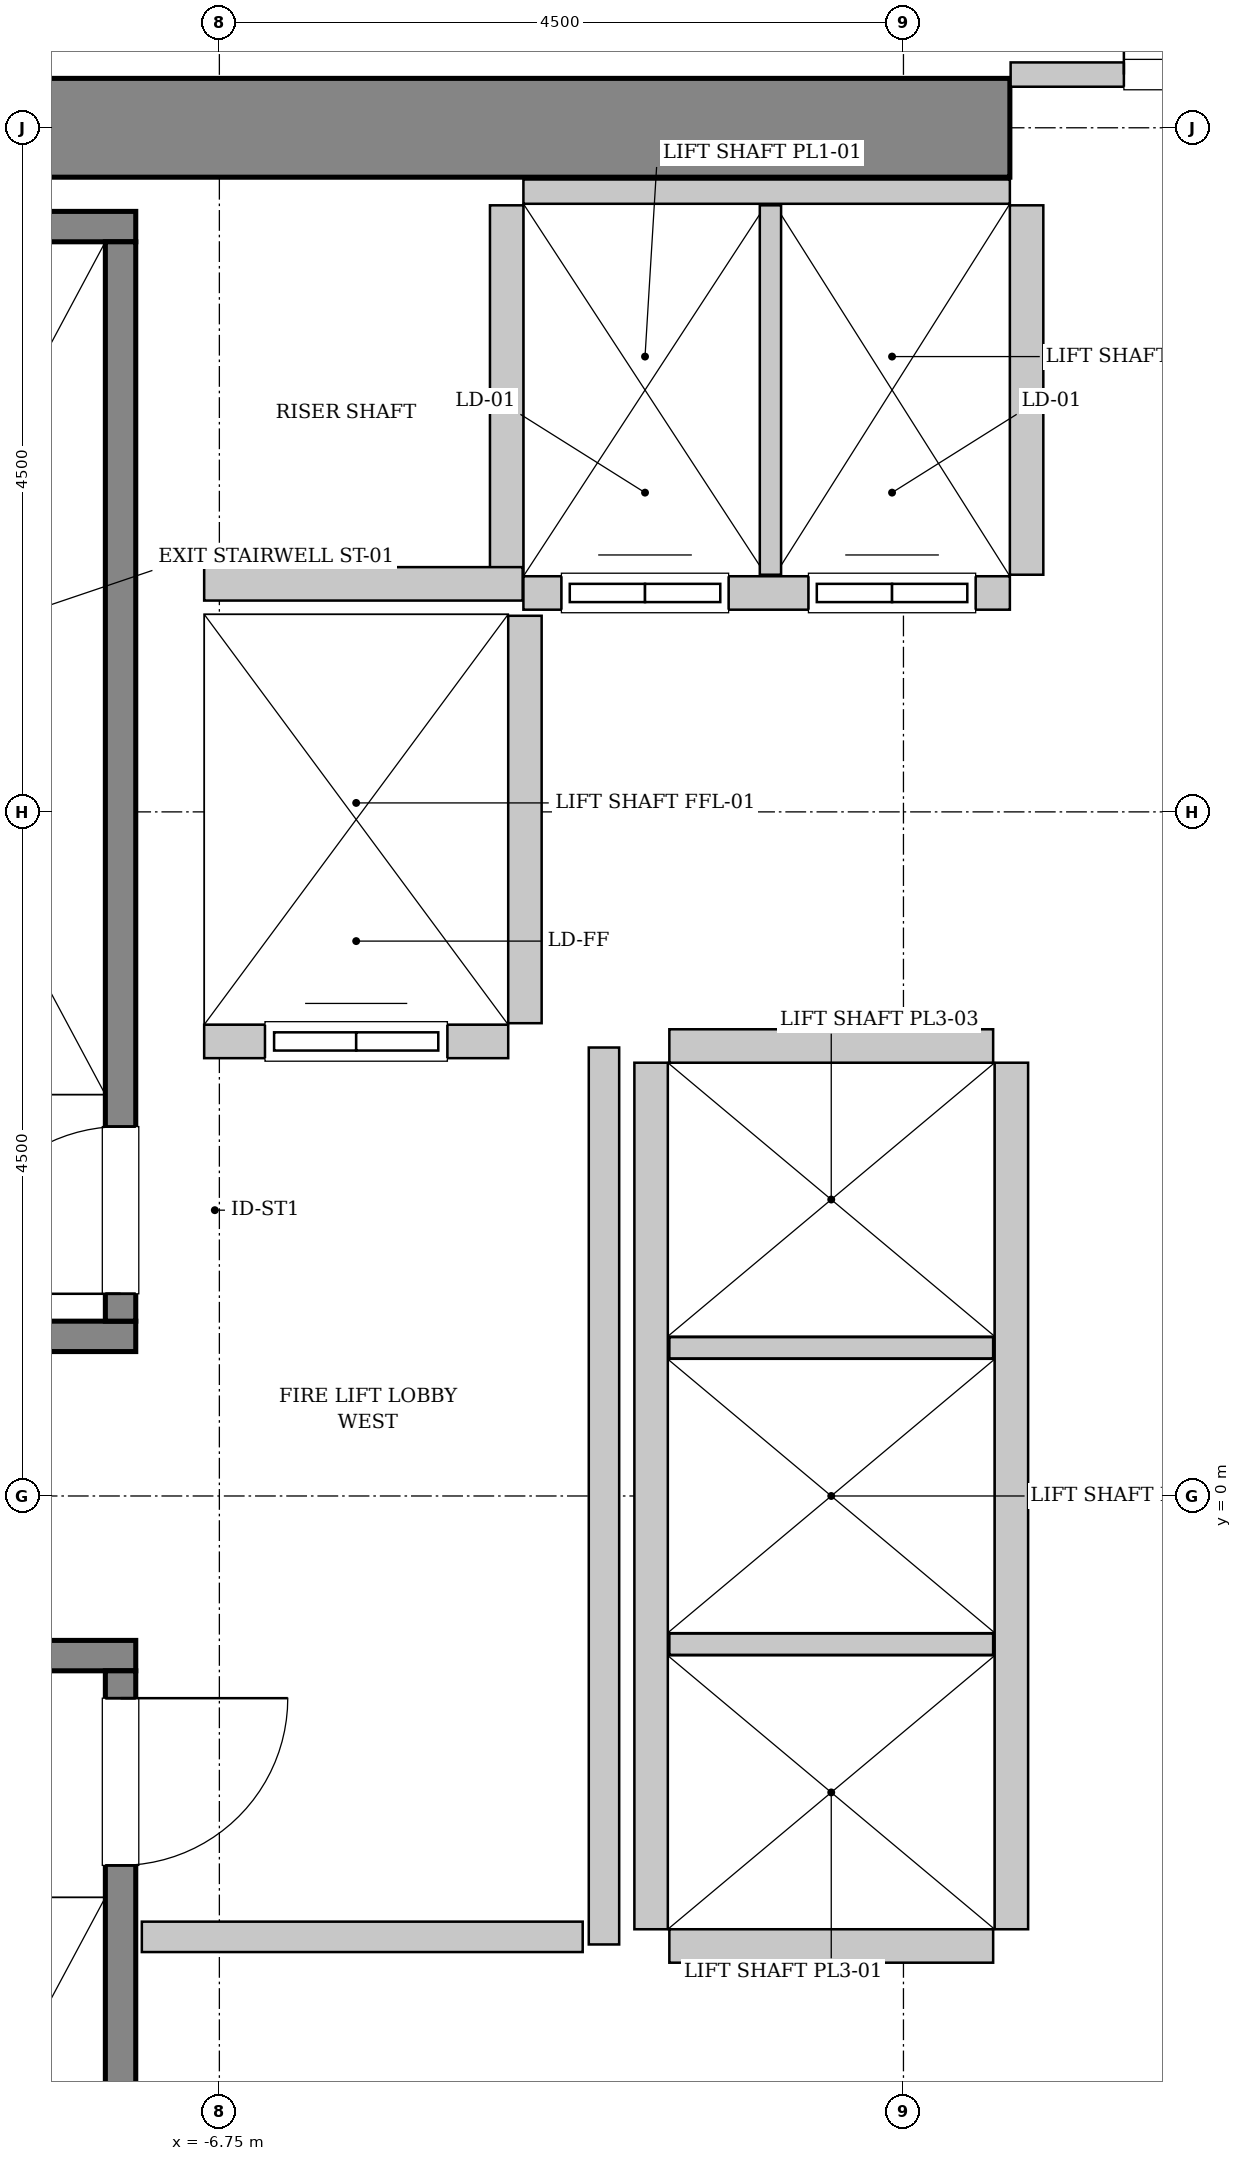
"""IFC4 building model, lengths in metres.
Left out: names, types, materials, properties, quantities, classifications, styles, units other than length and angle.
Written with IfcOpenShell. Run it as: python <this file> out.ifc"""

import sys

from ifc_helpers import new_model, si_unit, direction, frame, frame_2d, origin, place, context, subcontext, project, spatial, rectangle, extrude, source, transform, mapped, element, fill, save


model = new_model("IFC4")
c1 = context("Model", 3, precision=1e-05, world=origin(), true_north=direction((0.0, 1.0)))
c2 = subcontext(c1, "Body", "Model", "MODEL_VIEW")
j1 = project(units=[si_unit("LENGTHUNIT", "METRE"), si_unit("PLANEANGLEUNIT", "RADIAN")], contexts=[c1])
p1 = place(None, origin())
s1 = spatial("IfcSite", under=j1, at=p1, CompositionType="ELEMENT")
p2 = place(p1, origin())
s2 = spatial("IfcBuilding", under=s1, at=p2, CompositionType="ELEMENT")
p3 = place(p2, frame((0.0, 0.0, 16.8)))
s3 = spatial("IfcBuildingStorey", under=s2, at=p3, CompositionType="ELEMENT", Elevation=16.8)
m1 = source(origin(), c2, "Body", "SweptSolid", [
    extrude(rectangle(XDim=10.025, YDim=0.65, at=frame_2d((5.012, 0.0))), origin(), (0.0, 0.0, 1.0), 5.4),
])
p4 = place(p3, frame((-11.575, 9.0, 0.0), z_axis=(0.0, 0.0, 1.0), x_axis=(1.0, 0.0, 0.0)))
e1 = element("IfcWall", 1, at=p4, inside=s3, PredefinedType="SHEAR", context=c2, shape_type="MappedRepresentation", body=[
    mapped(m1, transform((0.0, 0.0, 0.0), x_axis=(1.0, 0.0, 0.0), y_axis=(0.0, 1.0, 0.0), z_axis=(0.0, 0.0, 1.0), scale=1.0)),
])
m2 = source(origin(), c2, "Body", "SweptSolid", [
    extrude(rectangle(XDim=3.4, YDim=0.2, at=frame_2d((1.7, 0.0))), origin(), (0.0, 0.0, 1.0), 5.4),
])
p5 = place(p3, frame((-7.3, 1.05, 0.0), z_axis=(0.0, 0.0, 1.0), x_axis=(-1.0, 0.0, 0.0)))
e2 = element("IfcWall", 2, at=p5, inside=s3, PredefinedType="SOLIDWALL", context=c2, shape_type="MappedRepresentation", body=[
    mapped(m2, transform((0.0, 0.0, 0.0), x_axis=(1.0, 0.0, 0.0), y_axis=(0.0, 1.0, 0.0), z_axis=(0.0, 0.0, 1.0), scale=1.0)),
])
m3 = source(origin(), c2, "Body", "SweptSolid", [
    extrude(rectangle(XDim=3.63, YDim=0.2, at=frame_2d((1.815, 0.0))), origin(), (0.0, 0.0, 1.0), 5.4),
])
p6 = place(p3, frame((-7.3, 8.35, 0.0), z_axis=(0.0, 0.0, 1.0), x_axis=(-1.0, 0.0, 0.0)))
e3 = element("IfcWall", 3, at=p6, inside=s3, PredefinedType="SOLIDWALL", context=c2, shape_type="MappedRepresentation", body=[
    mapped(m3, transform((0.0, 0.0, 0.0), x_axis=(1.0, 0.0, 0.0), y_axis=(0.0, 1.0, 0.0), z_axis=(0.0, 0.0, 1.0), scale=1.0)),
])
m4 = source(origin(), c2, "Body", "SweptSolid", [
    extrude(rectangle(XDim=7.1, YDim=0.2, at=frame_2d((3.55, 0.0))), origin(), (0.0, 0.0, 1.0), 5.4),
])
p7 = place(p3, frame((-7.4, 1.15, 0.0), z_axis=(0.0, 0.0, 1.0), x_axis=(0.0, 1.0, 0.0)))
e4 = element("IfcWall", 4, at=p7, inside=s3, PredefinedType="SOLIDWALL", context=c2, shape_type="MappedRepresentation", body=[
    mapped(m4, transform((0.0, 0.0, 0.0), x_axis=(1.0, 0.0, 0.0), y_axis=(0.0, 1.0, 0.0), z_axis=(0.0, 0.0, 1.0), scale=1.0)),
])
p8 = place(p7, frame((0.18, 0.0, 0.0)))
e5 = element("IfcOpeningElement", 5, at=p8, cuts=e4, PredefinedType="OPENING", context=c2, shape_type="SweptSolid", body=[
    extrude(rectangle(XDim=1.1, YDim=2.15, at=frame_2d((0.55, 1.075))), frame((0.0, 0.11, 0.0), z_axis=(0.0, -1.0, 0.0), x_axis=(1.0, 0.0, 0.0)), (0.0, 0.0, 1.0), 0.22),
])
p9 = place(p3, frame((-10.7, -1.05, 0.0), z_axis=(0.0, 0.0, 1.0), x_axis=(1.0, 0.0, 0.0)))
e6 = element("IfcWall", 6, at=p9, inside=s3, PredefinedType="SOLIDWALL", context=c2, shape_type="MappedRepresentation", body=[
    mapped(m2, transform((0.0, 0.0, 0.0), x_axis=(1.0, 0.0, 0.0), y_axis=(0.0, 1.0, 0.0), z_axis=(0.0, 0.0, 1.0), scale=1.0)),
])
p10 = place(p3, frame((-7.4, -1.15, 0.0), z_axis=(0.0, 0.0, 1.0), x_axis=(0.0, -1.0, 0.0)))
e7 = element("IfcWall", 7, at=p10, inside=s3, PredefinedType="SOLIDWALL", context=c2, shape_type="MappedRepresentation", body=[
    mapped(m4, transform((0.0, 0.0, 0.0), x_axis=(1.0, 0.0, 0.0), y_axis=(0.0, 1.0, 0.0), z_axis=(0.0, 0.0, 1.0), scale=1.0)),
])
p11 = place(p10, frame((0.18, 0.0, 0.0)))
e8 = element("IfcOpeningElement", 8, at=p11, cuts=e7, PredefinedType="OPENING", context=c2, shape_type="SweptSolid", body=[
    extrude(rectangle(XDim=1.1, YDim=2.15, at=frame_2d((0.55, 1.075))), frame((0.0, 0.11, 0.0), z_axis=(0.0, -1.0, 0.0), x_axis=(1.0, 0.0, 0.0)), (0.0, 0.0, 1.0), 0.22),
])
m5 = source(origin(), c2, "Body", "SweptSolid", [
    extrude(rectangle(XDim=2.0, YDim=0.22, at=frame_2d((1.0, 0.0))), origin(), (0.0, 0.0, 1.0), 5.085),
])
p12 = place(p3, frame((-6.85, 2.99, 0.0), z_axis=(0.0, 0.0, 1.0), x_axis=(1.0, 0.0, 0.0)))
e9 = element("IfcWall", 9, at=p12, inside=s3, PredefinedType="SOLIDWALL", context=c2, shape_type="MappedRepresentation", body=[
    mapped(m5, transform((0.0, 0.0, 0.0), x_axis=(1.0, 0.0, 0.0), y_axis=(0.0, 1.0, 0.0), z_axis=(0.0, 0.0, 1.0), scale=1.0)),
])
p13 = place(p12, frame((0.4, 0.0, 0.0)))
e10 = element("IfcOpeningElement", 10, at=p13, cuts=e9, PredefinedType="OPENING", context=c2, shape_type="SweptSolid", body=[
    extrude(rectangle(XDim=1.2, YDim=2.2, at=frame_2d((0.6, 1.1))), frame((0.0, 0.12, 0.0), z_axis=(0.0, -1.0, 0.0), x_axis=(1.0, 0.0, 0.0)), (0.0, 0.0, 1.0), 0.24),
])
m6 = source(origin(), c2, "Body", "SweptSolid", [
    extrude(rectangle(XDim=2.68, YDim=0.22, at=frame_2d((1.34, 0.0))), origin(), (0.0, 0.0, 1.0), 5.085),
])
p14 = place(p3, frame((-4.74, 3.11, 0.0), z_axis=(0.0, 0.0, 1.0), x_axis=(0.0, 1.0, 0.0)))
e11 = element("IfcWall", 11, at=p14, inside=s3, PredefinedType="SOLIDWALL", context=c2, shape_type="MappedRepresentation", body=[
    mapped(m6, transform((0.0, 0.0, 0.0), x_axis=(1.0, 0.0, 0.0), y_axis=(0.0, 1.0, 0.0), z_axis=(0.0, 0.0, 1.0), scale=1.0)),
])
m7 = source(origin(), c2, "Body", "SweptSolid", [
    extrude(rectangle(XDim=3.2, YDim=0.22, at=frame_2d((1.6, 0.0))), origin(), (0.0, 0.0, 1.0), 5.085),
])
p15 = place(p3, frame((-4.75, 5.94, 0.0), z_axis=(0.0, 0.0, 1.0), x_axis=(1.0, 0.0, 0.0)))
e12 = element("IfcWall", 12, at=p15, inside=s3, PredefinedType="SOLIDWALL", context=c2, shape_type="MappedRepresentation", body=[
    mapped(m7, transform((0.0, 0.0, 0.0), x_axis=(1.0, 0.0, 0.0), y_axis=(0.0, 1.0, 0.0), z_axis=(0.0, 0.0, 1.0), scale=1.0)),
])
p16 = place(p15, frame((0.25, 0.0, 0.0)))
e13 = element("IfcOpeningElement", 13, at=p16, cuts=e12, PredefinedType="OPENING", context=c2, shape_type="SweptSolid", body=[
    extrude(rectangle(XDim=1.1, YDim=2.2, at=frame_2d((0.55, 1.1))), frame((0.0, 0.12, 0.0), z_axis=(0.0, -1.0, 0.0), x_axis=(1.0, 0.0, 0.0)), (0.0, 0.0, 1.0), 0.24),
])
p17 = place(p15, frame((1.875, 0.0, 0.0)))
e14 = element("IfcOpeningElement", 14, at=p17, cuts=e12, PredefinedType="OPENING", context=c2, shape_type="SweptSolid", body=[
    extrude(rectangle(XDim=1.1, YDim=2.2, at=frame_2d((0.55, 1.1))), frame((0.0, 0.12, 0.0), z_axis=(0.0, -1.0, 0.0), x_axis=(1.0, 0.0, 0.0)), (0.0, 0.0, 1.0), 0.24),
])
m8 = source(origin(), c2, "Body", "SweptSolid", [
    extrude(rectangle(XDim=3.2, YDim=0.16, at=frame_2d((1.6, 0.0))), origin(), (0.0, 0.0, 1.0), 3.975),
])
p18 = place(p3, frame((-1.55, 8.58, 0.0), z_axis=(0.0, 0.0, 1.0), x_axis=(-1.0, 0.0, 0.0)))
e15 = element("IfcWall", 15, at=p18, inside=s3, PredefinedType="PARTITIONING", context=c2, shape_type="MappedRepresentation", body=[
    mapped(m8, transform((0.0, 0.0, 0.0), x_axis=(1.0, 0.0, 0.0), y_axis=(0.0, 1.0, 0.0), z_axis=(0.0, 0.0, 1.0), scale=1.0)),
])
m9 = source(origin(), c2, "Body", "SweptSolid", [
    extrude(rectangle(XDim=2.43, YDim=0.22, at=frame_2d((1.215, 0.0))), origin(), (0.0, 0.0, 1.0), 5.085),
])
p19 = place(p3, frame((-4.86, 8.49, 0.0), z_axis=(0.0, 0.0, 1.0), x_axis=(0.0, -1.0, 0.0)))
e16 = element("IfcWall", 16, at=p19, inside=s3, PredefinedType="SOLIDWALL", context=c2, shape_type="MappedRepresentation", body=[
    mapped(m9, transform((0.0, 0.0, 0.0), x_axis=(1.0, 0.0, 0.0), y_axis=(0.0, 1.0, 0.0), z_axis=(0.0, 0.0, 1.0), scale=1.0)),
])
m10 = source(origin(), c2, "Body", "SweptSolid", [
    extrude(rectangle(XDim=2.43, YDim=0.14, at=frame_2d((1.215, 0.0))), origin(), (0.0, 0.0, 1.0), 5.085),
])
p20 = place(p3, frame((-3.125, 6.06, 0.0), z_axis=(0.0, 0.0, 1.0), x_axis=(0.0, 1.0, 0.0)))
e17 = element("IfcWall", 17, at=p20, inside=s3, PredefinedType="PARTITIONING", context=c2, shape_type="MappedRepresentation", body=[
    mapped(m10, transform((0.0, 0.0, 0.0), x_axis=(1.0, 0.0, 0.0), y_axis=(0.0, 1.0, 0.0), z_axis=(0.0, 0.0, 1.0), scale=1.0)),
])
p21 = place(p3, frame((-1.44, 6.06, 0.0), z_axis=(0.0, 0.0, 1.0), x_axis=(0.0, 1.0, 0.0)))
e18 = element("IfcWall", 18, at=p21, inside=s3, PredefinedType="SOLIDWALL", context=c2, shape_type="MappedRepresentation", body=[
    mapped(m9, transform((0.0, 0.0, 0.0), x_axis=(1.0, 0.0, 0.0), y_axis=(0.0, 1.0, 0.0), z_axis=(0.0, 0.0, 1.0), scale=1.0)),
])
m11 = source(origin(), c2, "Body", "SweptSolid", [
    extrude(rectangle(XDim=5.7, YDim=0.22, at=frame_2d((2.85, 0.0))), origin(), (0.0, 0.0, 1.0), 5.085),
])
for number, where, z_axis, x_axis in (
    (19, (-1.54, -2.85, 0.0), (0.0, 0.0, 1.0), (0.0, 1.0, 0.0)),
    (20, (-3.91, 2.85, 0.0), (0.0, 0.0, 1.0), (0.0, -1.0, 0.0)),
):
    element("IfcWall", number, at=place(p3, frame(where, z_axis=z_axis, x_axis=x_axis)), inside=s3, PredefinedType="SOLIDWALL", context=c2, shape_type="MappedRepresentation", body=[
        mapped(m11, transform((0.0, 0.0, 0.0), x_axis=(1.0, 0.0, 0.0), y_axis=(0.0, 1.0, 0.0), z_axis=(0.0, 0.0, 1.0), scale=1.0)),
    ])
m12 = source(origin(), c2, "Body", "SweptSolid", [
    extrude(rectangle(XDim=2.13, YDim=0.22, at=frame_2d((1.065, 0.0))), origin(), (0.0, 0.0, 1.0), 5.085),
])
p22 = place(p3, frame((-3.79, -2.96, 0.0), z_axis=(0.0, 0.0, 1.0), x_axis=(1.0, 0.0, 0.0)))
e21 = element("IfcWall", 21, at=p22, inside=s3, PredefinedType="SOLIDWALL", context=c2, shape_type="MappedRepresentation", body=[
    mapped(m12, transform((0.0, 0.0, 0.0), x_axis=(1.0, 0.0, 0.0), y_axis=(0.0, 1.0, 0.0), z_axis=(0.0, 0.0, 1.0), scale=1.0)),
])
m13 = source(origin(), c2, "Body", "SweptSolid", [
    extrude(rectangle(XDim=2.13, YDim=0.14, at=frame_2d((1.065, 0.0))), origin(), (0.0, 0.0, 1.0), 5.085),
])
for number, where, z_axis, x_axis in (
    (22, (-3.79, -0.975, 0.0), (0.0, 0.0, 1.0), (1.0, 0.0, 0.0)),
    (23, (-3.79, 0.975, 0.0), (0.0, 0.0, 1.0), (1.0, 0.0, 0.0)),
):
    element("IfcWall", number, at=place(p3, frame(where, z_axis=z_axis, x_axis=x_axis)), inside=s3, PredefinedType="PARTITIONING", context=c2, shape_type="MappedRepresentation", body=[
        mapped(m13, transform((0.0, 0.0, 0.0), x_axis=(1.0, 0.0, 0.0), y_axis=(0.0, 1.0, 0.0), z_axis=(0.0, 0.0, 1.0), scale=1.0)),
    ])
p23 = place(p3, frame((-1.66, 2.96, 0.0), z_axis=(0.0, 0.0, 1.0), x_axis=(-1.0, 0.0, 0.0)))
e24 = element("IfcWall", 24, at=p23, inside=s3, PredefinedType="SOLIDWALL", context=c2, shape_type="MappedRepresentation", body=[
    mapped(m12, transform((0.0, 0.0, 0.0), x_axis=(1.0, 0.0, 0.0), y_axis=(0.0, 1.0, 0.0), z_axis=(0.0, 0.0, 1.0), scale=1.0)),
])
m14 = source(origin(), c2, "Body", "SweptSolid", [
    extrude(rectangle(XDim=2.095, YDim=0.22, at=frame_2d((1.048, 0.0))), origin(), (0.0, 0.0, 1.0), 5.085),
])
p24 = place(p3, frame((-6.85, 6.0, 0.0), z_axis=(0.0, 0.0, 1.0), x_axis=(1.0, 0.0, 0.0)))
e25 = element("IfcWall", 25, at=p24, inside=s3, PredefinedType="SOLIDWALL", context=c2, shape_type="MappedRepresentation", body=[
    mapped(m14, transform((0.0, 0.0, 0.0), x_axis=(1.0, 0.0, 0.0), y_axis=(0.0, 1.0, 0.0), z_axis=(0.0, 0.0, 1.0), scale=1.0)),
])
m15 = source(origin(), c2, "Body", "SweptSolid", [
    extrude(rectangle(XDim=5.9, YDim=0.2, at=frame_2d((2.95, 0.0))), origin(), (0.0, 0.0, 1.0), 5.085),
])
p25 = place(p3, frame((-4.22, -2.95, 0.0), z_axis=(0.0, 0.0, 1.0), x_axis=(0.0, 1.0, 0.0)))
e26 = element("IfcWall", 26, at=p25, inside=s3, PredefinedType="PARTITIONING", context=c2, shape_type="MappedRepresentation", body=[
    mapped(m15, transform((0.0, 0.0, 0.0), x_axis=(1.0, 0.0, 0.0), y_axis=(0.0, 1.0, 0.0), z_axis=(0.0, 0.0, 1.0), scale=1.0)),
])
m16 = source(origin(), c2, "Body", "SweptSolid", [
    extrude(rectangle(XDim=2.9, YDim=0.2, at=frame_2d((1.45, 0.0))), origin(), (0.0, 0.0, 1.0), 5.085),
])
p26 = place(p3, frame((-7.26, -2.9, 0.0), z_axis=(0.0, 0.0, 1.0), x_axis=(1.0, 0.0, 0.0)))
e27 = element("IfcWall", 27, at=p26, inside=s3, PredefinedType="PARTITIONING", context=c2, shape_type="MappedRepresentation", body=[
    mapped(m16, transform((0.0, 0.0, 0.0), x_axis=(1.0, 0.0, 0.0), y_axis=(0.0, 1.0, 0.0), z_axis=(0.0, 0.0, 1.0), scale=1.0)),
])
m17 = source(origin(), c2, "Body", "SweptSolid", [
    extrude(rectangle(XDim=3.09, YDim=0.16, at=frame_2d((1.545, 0.0))), origin(), (0.0, 0.0, 1.0), 3.975),
])
p27 = place(p3, frame((-1.545, 9.35, 0.0), z_axis=(0.0, 0.0, 1.0), x_axis=(1.0, 0.0, 0.0)))
e28 = element("IfcWall", 28, at=p27, inside=s3, PredefinedType="PARTITIONING", context=c2, shape_type="MappedRepresentation", body=[
    mapped(m17, transform((0.0, 0.0, 0.0), x_axis=(1.0, 0.0, 0.0), y_axis=(0.0, 1.0, 0.0), z_axis=(0.0, 0.0, 1.0), scale=1.0)),
])
p28 = place(p27, frame((0.745, 0.0, 0.0)))
e29 = element("IfcOpeningElement", 29, at=p28, cuts=e28, PredefinedType="OPENING", context=c2, shape_type="SweptSolid", body=[
    extrude(rectangle(XDim=1.6, YDim=2.3, at=frame_2d((0.8, 1.15))), frame((0.0, 0.09, 0.0), z_axis=(0.0, -1.0, 0.0), x_axis=(1.0, 0.0, 0.0)), (0.0, 0.0, 1.0), 0.18),
])
m18 = source(origin(), c2, "Body", "SweptSolid", [
    extrude(rectangle(XDim=1.1, YDim=2.15, at=frame_2d((0.55, 1.075))), frame((0.0, 0.025, 0.0), z_axis=(0.0, -1.0, 0.0), x_axis=(1.0, 0.0, 0.0)), (0.0, 0.0, 1.0), 0.05),
])
p29 = place(p8, origin())
e30 = element("IfcDoor", 30, at=p29, inside=s3, OperationType="SINGLE_SWING_LEFT", PredefinedType="DOOR", context=c2, shape_type="MappedRepresentation", body=[
    mapped(m18, transform((0.0, 0.0, 0.0), x_axis=(1.0, 0.0, 0.0), y_axis=(0.0, 1.0, 0.0), z_axis=(0.0, 0.0, 1.0), scale=1.0)),
])
fill(e5, e30)
p30 = place(p11, origin())
e31 = element("IfcDoor", 31, at=p30, inside=s3, OperationType="SINGLE_SWING_LEFT", PredefinedType="DOOR", context=c2, shape_type="MappedRepresentation", body=[
    mapped(m18, transform((0.0, 0.0, 0.0), x_axis=(1.0, 0.0, 0.0), y_axis=(0.0, 1.0, 0.0), z_axis=(0.0, 0.0, 1.0), scale=1.0)),
])
fill(e8, e31)
m19 = source(origin(), c2, "Body", "SweptSolid", [
    extrude(rectangle(XDim=1.2, YDim=2.2, at=frame_2d((0.6, 1.1))), frame((0.0, 0.025, 0.0), z_axis=(0.0, -1.0, 0.0), x_axis=(1.0, 0.0, 0.0)), (0.0, 0.0, 1.0), 0.05),
])
p31 = place(p13, origin())
e32 = element("IfcDoor", 32, at=p31, inside=s3, OperationType="SLIDING_TO_LEFT", PredefinedType="DOOR", context=c2, shape_type="MappedRepresentation", body=[
    mapped(m19, transform((0.0, 0.0, 0.0), x_axis=(1.0, 0.0, 0.0), y_axis=(0.0, 1.0, 0.0), z_axis=(0.0, 0.0, 1.0), scale=1.0)),
])
fill(e10, e32)
m20 = source(origin(), c2, "Body", "SweptSolid", [
    extrude(rectangle(XDim=1.1, YDim=2.2, at=frame_2d((0.55, 1.1))), frame((0.0, 0.025, 0.0), z_axis=(0.0, -1.0, 0.0), x_axis=(1.0, 0.0, 0.0)), (0.0, 0.0, 1.0), 0.05),
])
p32 = place(p16, origin())
e33 = element("IfcDoor", 33, at=p32, inside=s3, OperationType="DOUBLE_DOOR_SLIDING", PredefinedType="DOOR", context=c2, shape_type="MappedRepresentation", body=[
    mapped(m20, transform((0.0, 0.0, 0.0), x_axis=(1.0, 0.0, 0.0), y_axis=(0.0, 1.0, 0.0), z_axis=(0.0, 0.0, 1.0), scale=1.0)),
])
fill(e13, e33)
p33 = place(p17, origin())
e34 = element("IfcDoor", 34, at=p33, inside=s3, OperationType="DOUBLE_DOOR_SLIDING", PredefinedType="DOOR", context=c2, shape_type="MappedRepresentation", body=[
    mapped(m20, transform((0.0, 0.0, 0.0), x_axis=(1.0, 0.0, 0.0), y_axis=(0.0, 1.0, 0.0), z_axis=(0.0, 0.0, 1.0), scale=1.0)),
])
fill(e14, e34)
m21 = source(origin(), c2, "Body", "SweptSolid", [
    extrude(rectangle(XDim=1.6, YDim=2.3, at=frame_2d((0.8, 1.15))), frame((0.0, 0.025, 0.0), z_axis=(0.0, -1.0, 0.0), x_axis=(1.0, 0.0, 0.0)), (0.0, 0.0, 1.0), 0.05),
])
p34 = place(p28, origin())
e35 = element("IfcDoor", 35, at=p34, inside=s3, OperationType="DOUBLE_DOOR_SINGLE_SWING", PredefinedType="DOOR", context=c2, shape_type="MappedRepresentation", body=[
    mapped(m21, transform((0.0, 0.0, 0.0), x_axis=(1.0, 0.0, 0.0), y_axis=(0.0, 1.0, 0.0), z_axis=(0.0, 0.0, 1.0), scale=1.0)),
])
fill(e29, e35)
save(model, sys.argv[1])
